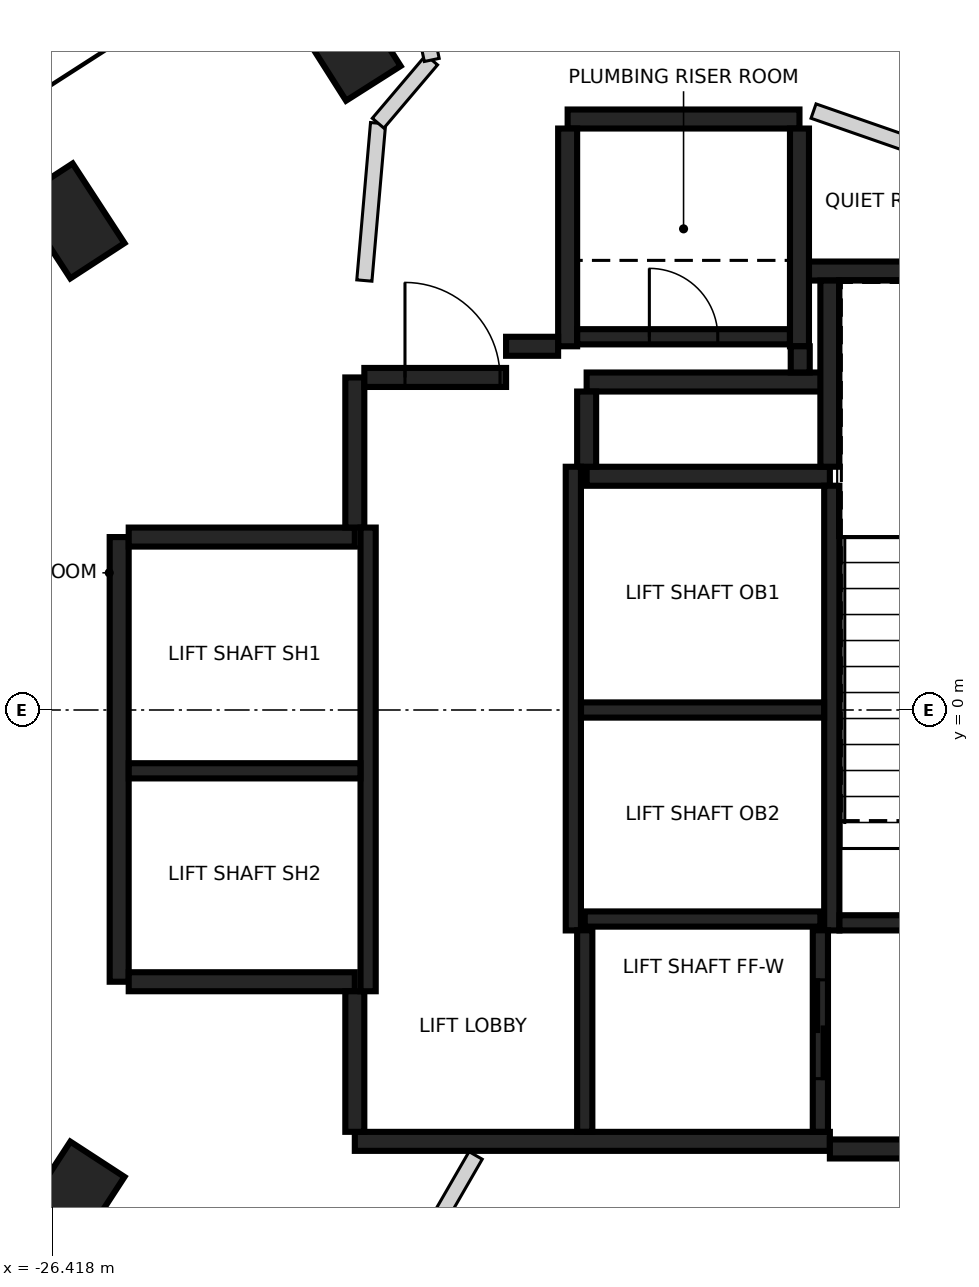
"""IFC4 building model, lengths in metres.
Left out: names, types, materials, properties, quantities, classifications, styles, units other than length and angle.
Written with IfcOpenShell. Run it as: python <this file> out.ifc"""

import sys

from ifc_helpers import new_model, si_unit, direction, frame, frame_2d, origin, origin_2d, place, context, subcontext, project, spatial, rectangle, extrude, element, fill, save


model = new_model("IFC4")
c1 = context("Model", 3, precision=1e-05, world=origin(), true_north=direction((0.0, 1.0)))
c2 = subcontext(c1, "Body", "Model", "MODEL_VIEW")
j1 = project(units=[si_unit("LENGTHUNIT", "METRE"), si_unit("PLANEANGLEUNIT", "RADIAN")], contexts=[c1])
p1 = place(None, origin())
s1 = spatial("IfcSite", under=j1, at=p1, CompositionType="ELEMENT")
p2 = place(p1, origin())
s2 = spatial("IfcBuilding", under=s1, at=p2, CompositionType="ELEMENT")
p3 = place(p2, frame((0.0, 0.0, 157.6)))
s3 = spatial("IfcBuildingStorey", under=s2, at=p3, CompositionType="ELEMENT", Elevation=157.6)
for number, where, z_axis, x_axis in (
    (1, (-22.529, 8.772, -0.4), (0.0, 0.0, 1.0), (-0.536, 0.844, 0.0)),
    (2, (-26.165, 6.434, -0.4), (0.0, 0.0, 1.0), (-0.546, 0.838, 0.0)),
    (3, (-26.165, -6.434, -0.4), (0.0, 0.0, 1.0), (0.546, 0.838, 0.0)),
):
    element("IfcColumn", number, at=place(p3, frame(where, z_axis=z_axis, x_axis=x_axis)), inside=s3, PredefinedType="COLUMN", context=c2, shape_type="SweptSolid", body=[
        extrude(rectangle(XDim=1.25, YDim=0.85, at=origin_2d()), origin(), (0.0, 0.0, 1.0), 3.6),
    ])
p4 = place(p3, frame((-16.187, -5.675, 0.0), z_axis=(0.0, 0.0, 1.0), x_axis=(-1.0, 0.0, 0.0)))
e4 = element("IfcWall", 4, at=p4, inside=s3, PredefinedType="SHEAR", context=c2, shape_type="SweptSolid", body=[
    extrude(rectangle(XDim=6.25, YDim=0.25, at=frame_2d((3.125, 0.0))), origin(), (0.0, 0.0, 1.0), 3.2),
])
p5 = place(p3, frame((-25.537, -3.575, 0.0), z_axis=(0.0, 0.0, 1.0), x_axis=(0.0, 1.0, 0.0)))
e5 = element("IfcWall", 5, at=p5, inside=s3, PredefinedType="SHEAR", context=c2, shape_type="SweptSolid", body=[
    extrude(rectangle(XDim=5.85, YDim=0.25, at=frame_2d((2.925, 0.0))), origin(), (0.0, 0.0, 1.0), 3.2),
])
p6 = place(p3, frame((-10.963, -5.775, 0.0), z_axis=(0.0, 0.0, 1.0), x_axis=(-1.0, 0.0, 0.0)))
e6 = element("IfcWall", 6, at=p6, inside=s3, PredefinedType="SHEAR", context=c2, shape_type="SweptSolid", body=[
    extrude(rectangle(XDim=5.225, YDim=0.25, at=frame_2d((2.612, 0.0))), origin(), (0.0, 0.0, 1.0), 3.2),
])
p7 = place(p3, frame((-16.472, 5.775, 0.0), z_axis=(0.0, 0.0, 1.0), x_axis=(1.0, 0.0, 0.0)))
e7 = element("IfcWall", 7, at=p7, inside=s3, PredefinedType="SHEAR", context=c2, shape_type="SweptSolid", body=[
    extrude(rectangle(XDim=5.51, YDim=0.25, at=frame_2d((2.755, 0.0))), origin(), (0.0, 0.0, 1.0), 3.2),
])
p8 = place(p3, frame((-19.387, 3.075, 0.0), z_axis=(0.0, 0.0, 1.0), x_axis=(1.0, 0.0, 0.0)))
e8 = element("IfcWall", 8, at=p8, inside=s3, PredefinedType="SHEAR", context=c2, shape_type="SweptSolid", body=[
    extrude(rectangle(XDim=3.2, YDim=0.25, at=frame_2d((1.6, 0.0))), origin(), (0.0, 0.0, 1.0), 3.2),
])
for number, where, z_axis, x_axis in (
    (9, (-22.437, -3.575, 0.0), (0.0, 0.0, 1.0), (-1.0, 0.0, 0.0)),
    (10, (-25.412, 2.275, 0.0), (0.0, 0.0, 1.0), (1.0, 0.0, 0.0)),
):
    element("IfcWall", number, at=place(p3, frame(where, z_axis=z_axis, x_axis=x_axis)), inside=s3, PredefinedType="SHEAR", context=c2, shape_type="SweptSolid", body=[
        extrude(rectangle(XDim=2.975, YDim=0.25, at=frame_2d((1.487, 0.0))), origin(), (0.0, 0.0, 1.0), 3.2),
    ])
p9 = place(p3, frame((-19.637, 7.775, 0.0), z_axis=(0.0, 0.0, 1.0), x_axis=(1.0, 0.0, 0.0)))
e11 = element("IfcWall", 11, at=p9, inside=s3, PredefinedType="SHEAR", context=c2, shape_type="SweptSolid", body=[
    extrude(rectangle(XDim=3.05, YDim=0.25, at=frame_2d((1.525, 0.0))), origin(), (0.0, 0.0, 1.0), 3.2),
])
for number, where, z_axis, x_axis in (
    (12, (-16.587, 7.65, 0.0), (0.0, 0.0, 1.0), (0.0, -1.0, 0.0)),
    (13, (-19.637, 4.785, 0.0), (0.0, 0.0, 1.0), (0.0, 1.0, 0.0)),
):
    element("IfcWall", number, at=place(p3, frame(where, z_axis=z_axis, x_axis=x_axis)), inside=s3, PredefinedType="SHEAR", context=c2, shape_type="SweptSolid", body=[
        extrude(rectangle(XDim=2.865, YDim=0.25, at=frame_2d((1.432, 0.0))), origin(), (0.0, 0.0, 1.0), 3.2),
    ])
p10 = place(p3, frame((-16.302, 4.315, 0.0), z_axis=(0.0, 0.0, 1.0), x_axis=(-1.0, 0.0, 0.0)))
e14 = element("IfcWall", 14, at=p10, inside=s3, PredefinedType="SHEAR", context=c2, shape_type="SweptSolid", body=[
    extrude(rectangle(XDim=3.085, YDim=0.25, at=frame_2d((1.542, 0.0))), origin(), (0.0, 0.0, 1.0), 3.2),
])
p11 = place(p3, frame((-16.187, 3.2, 0.0), z_axis=(0.0, 0.0, 1.0), x_axis=(0.0, 1.0, 0.0)))
e15 = element("IfcWall", 15, at=p11, inside=s3, PredefinedType="SHEAR", context=c2, shape_type="SweptSolid", body=[
    extrude(rectangle(XDim=2.449, YDim=0.25, at=frame_2d((1.225, 0.0))), origin(), (0.0, 0.0, 1.0), 3.2),
])
p12 = place(p3, frame((-22.437, 2.4, 0.0), z_axis=(0.0, 0.0, 1.0), x_axis=(0.0, 1.0, 0.0)))
e16 = element("IfcWall", 16, at=p12, inside=s3, PredefinedType="SHEAR", context=c2, shape_type="SweptSolid", body=[
    extrude(rectangle(XDim=1.975, YDim=0.25, at=frame_2d((0.987, 0.0))), origin(), (0.0, 0.0, 1.0), 3.2),
])
p13 = place(p3, frame((-22.437, -5.55, 0.0), z_axis=(0.0, 0.0, 1.0), x_axis=(0.0, 1.0, 0.0)))
e17 = element("IfcWall", 17, at=p13, inside=s3, PredefinedType="SHEAR", context=c2, shape_type="SweptSolid", body=[
    extrude(rectangle(XDim=1.849, YDim=0.25, at=frame_2d((0.925, 0.0))), origin(), (0.0, 0.0, 1.0), 3.2),
])
p14 = place(p3, frame((-22.312, 4.375, 0.0), z_axis=(0.0, 0.0, 1.0), x_axis=(1.0, 0.0, 0.0)))
e18 = element("IfcWall", 18, at=p14, inside=s3, PredefinedType="SHEAR", context=c2, shape_type="SweptSolid", body=[
    extrude(rectangle(XDim=1.865, YDim=0.25, at=frame_2d((0.932, 0.0))), origin(), (0.0, 0.0, 1.0), 3.2),
])
p15 = place(p14, frame((0.535, 0.0, 0.0)))
e19 = element("IfcOpeningElement", 19, at=p15, cuts=e18, PredefinedType="OPENING", context=c2, shape_type="SweptSolid", body=[
    extrude(rectangle(XDim=1.25, YDim=2.1, at=frame_2d((0.625, 1.05))), frame((0.0, 0.135, 0.0), z_axis=(0.0, -1.0, 0.0), x_axis=(1.0, 0.0, 0.0)), (0.0, 0.0, 1.0), 0.27),
])
p16 = place(p3, frame((-19.387, 4.19, 0.0), z_axis=(0.0, 0.0, 1.0), x_axis=(0.0, -1.0, 0.0)))
e20 = element("IfcWall", 20, at=p16, inside=s3, PredefinedType="SHEAR", context=c2, shape_type="SweptSolid", body=[
    extrude(rectangle(XDim=0.989, YDim=0.25, at=frame_2d((0.495, 0.0))), origin(), (0.0, 0.0, 1.0), 3.2),
])
p17 = place(p3, frame((-20.447, 4.785, 0.0), z_axis=(0.0, 0.0, 1.0), x_axis=(1.0, 0.0, 0.0)))
e21 = element("IfcWall", 21, at=p17, inside=s3, PredefinedType="SHEAR", context=c2, shape_type="SweptSolid", body=[
    extrude(rectangle(XDim=0.685, YDim=0.25, at=frame_2d((0.342, 0.0))), origin(), (0.0, 0.0, 1.0), 3.2),
])
p18 = place(p3, frame((-16.577, 4.785, 0.0), z_axis=(0.0, 0.0, 1.0), x_axis=(0.0, -1.0, 0.0)))
e22 = element("IfcWall", 22, at=p18, inside=s3, PredefinedType="SHEAR", context=c2, shape_type="SweptSolid", body=[
    extrude(rectangle(XDim=0.344, YDim=0.25, at=frame_2d((0.172, 0.0))), origin(), (0.0, 0.0, 1.0), 3.2),
])
p19 = place(p3, frame((-16.162, 2.951, 0.0), z_axis=(0.0, 0.0, 1.0), x_axis=(0.0, -1.0, 0.0)))
e23 = element("IfcWall", 23, at=p19, inside=s3, PredefinedType="SHEAR", context=c2, shape_type="SweptSolid", body=[
    extrude(rectangle(XDim=5.851, YDim=0.2, at=frame_2d((2.925, 0.0))), origin(), (0.0, 0.0, 1.0), 3.2),
])
for number, where, z_axis, x_axis in (
    (24, (-19.562, -2.9, 0.0), (0.0, 0.0, 1.0), (0.0, 1.0, 0.0)),
    (25, (-22.262, 2.4, 0.0), (0.0, 0.0, 1.0), (0.0, -1.0, 0.0)),
):
    element("IfcWall", number, at=place(p3, frame(where, z_axis=z_axis, x_axis=x_axis)), inside=s3, PredefinedType="SHEAR", context=c2, shape_type="SweptSolid", body=[
        extrude(rectangle(XDim=6.1, YDim=0.2, at=frame_2d((3.05, 0.0))), origin(), (0.0, 0.0, 1.0), 3.2),
    ])
p20 = place(p3, frame((-10.963, -2.8, 0.0), z_axis=(0.0, 0.0, 1.0), x_axis=(-1.0, 0.0, 0.0)))
e26 = element("IfcWall", 26, at=p20, inside=s3, PredefinedType="SHEAR", context=c2, shape_type="SweptSolid", body=[
    extrude(rectangle(XDim=5.098, YDim=0.2, at=frame_2d((2.549, 0.0))), origin(), (0.0, 0.0, 1.0), 3.2),
])
p21 = place(p20, frame((1.774, 0.0, 0.0)))
e27 = element("IfcOpeningElement", 27, at=p21, cuts=e26, PredefinedType="OPENING", context=c2, shape_type="SweptSolid", body=[
    extrude(rectangle(XDim=1.4, YDim=2.1, at=frame_2d((0.7, 1.05))), frame((0.0, 0.11, 0.0), z_axis=(0.0, -1.0, 0.0), x_axis=(1.0, 0.0, 0.0)), (0.0, 0.0, 1.0), 0.22),
])
p22 = place(p3, frame((-16.263, 0.0, 0.0), z_axis=(0.0, 0.0, 1.0), x_axis=(-1.0, 0.0, 0.0)))
e28 = element("IfcWall", 28, at=p22, inside=s3, PredefinedType="SHEAR", context=c2, shape_type="SweptSolid", body=[
    extrude(rectangle(XDim=3.198, YDim=0.2, at=frame_2d((1.599, 0.0))), origin(), (0.0, 0.0, 1.0), 3.2),
])
p23 = place(p3, frame((-22.363, -0.8, 0.0), z_axis=(0.0, 0.0, 1.0), x_axis=(-1.0, 0.0, 0.0)))
e29 = element("IfcWall", 29, at=p23, inside=s3, PredefinedType="SHEAR", context=c2, shape_type="SweptSolid", body=[
    extrude(rectangle(XDim=3.048, YDim=0.2, at=frame_2d((1.524, 0.0))), origin(), (0.0, 0.0, 1.0), 3.2),
])
p24 = place(p3, frame((-19.511, 4.91, 0.0), z_axis=(0.0, 0.0, 1.0), x_axis=(1.0, 0.0, 0.0)))
e30 = element("IfcWall", 30, at=p24, inside=s3, PredefinedType="SHEAR", context=c2, shape_type="SweptSolid", body=[
    extrude(rectangle(XDim=2.798, YDim=0.2, at=frame_2d((1.399, 0.0))), origin(), (0.0, 0.0, 1.0), 3.2),
])
p25 = place(p24, frame((0.949, 0.0, 0.0)))
e31 = element("IfcOpeningElement", 31, at=p25, cuts=e30, PredefinedType="OPENING", context=c2, shape_type="SweptSolid", body=[
    extrude(rectangle(XDim=0.9, YDim=2.1, at=frame_2d((0.45, 1.05))), frame((0.0, 0.11, 0.0), z_axis=(0.0, -1.0, 0.0), x_axis=(1.0, 0.0, 0.0)), (0.0, 0.0, 1.0), 0.22),
])
p26 = place(p3, frame((-19.412, -2.75, 0.0), z_axis=(0.0, 0.0, 1.0), x_axis=(1.0, 0.0, 0.0)))
e32 = element("IfcWall", 32, at=p26, inside=s3, PredefinedType="SHEAR", context=c2, shape_type="SweptSolid", body=[
    extrude(rectangle(XDim=3.1, YDim=0.2, at=frame_2d((1.55, 0.0))), origin(), (0.0, 0.0, 1.0), 3.2),
])
p27 = place(p3, frame((-16.312, -2.898, 0.0), z_axis=(0.0, 0.0, 1.0), x_axis=(0.0, -1.0, 0.0)))
e33 = element("IfcWall", 33, at=p27, inside=s3, PredefinedType="SHEAR", context=c2, shape_type="SweptSolid", body=[
    extrude(rectangle(XDim=2.651, YDim=0.2, at=frame_2d((1.325, 0.0))), origin(), (0.0, 0.0, 1.0), 3.2),
])
p28 = place(p27, frame((0.652, 0.0, 0.0)))
e34 = element("IfcOpeningElement", 34, at=p28, cuts=e33, PredefinedType="OPENING", context=c2, shape_type="SweptSolid", body=[
    extrude(rectangle(XDim=1.3, YDim=2.1, at=frame_2d((0.65, 1.05))), frame((0.0, 0.11, 0.0), z_axis=(0.0, -1.0, 0.0), x_axis=(1.0, 0.0, 0.0)), (0.0, 0.0, 1.0), 0.22),
])
p29 = place(p3, frame((-19.412, -5.549, 0.0), z_axis=(0.0, 0.0, 1.0), x_axis=(0.0, 1.0, 0.0)))
e35 = element("IfcWall", 35, at=p29, inside=s3, PredefinedType="SHEAR", context=c2, shape_type="SweptSolid", body=[
    extrude(rectangle(XDim=2.651, YDim=0.2, at=frame_2d((1.325, 0.0))), origin(), (0.0, 0.0, 1.0), 3.2),
])
p30 = place(p3, frame((-22.131, 7.72, 0.0), z_axis=(0.0, 0.0, 1.0), x_axis=(-0.086827346826, -0.996223374471, 0.0)))
e36 = element("IfcWall", 36, at=p30, inside=s3, PredefinedType="PARTITIONING", context=c2, shape_type="SweptSolid", body=[
    extrude(rectangle(XDim=2.078, YDim=0.2, at=frame_2d((1.039, 0.0))), origin(), (0.0, 0.0, 1.0), 3.2),
])
p31 = place(p3, frame((-22.131, 7.72, 0.0), z_axis=(0.0, 0.0, 1.0), x_axis=(0.647024749006, 0.762468998828, 0.0)))
e37 = element("IfcWall", 37, at=p31, inside=s3, PredefinedType="PARTITIONING", context=c2, shape_type="SweptSolid", body=[
    extrude(rectangle(XDim=1.091, YDim=0.2, at=frame_2d((0.546, 0.0))), origin(), (0.0, 0.0, 1.0), 3.2),
])
p32 = place(p3, frame((-21.605, 9.412, 0.0), z_axis=(0.0, 0.0, 1.0), x_axis=(0.204764111512, -0.978811349871, 0.0)))
e38 = element("IfcWall", 38, at=p32, inside=s3, PredefinedType="PARTITIONING", context=c2, shape_type="SweptSolid", body=[
    extrude(rectangle(XDim=0.879, YDim=0.2, at=frame_2d((0.439, 0.0))), origin(), (0.0, 0.0, 1.0), 2.3),
])
p33 = place(p3, frame((-16.402, 7.879, 0.0), z_axis=(0.0, 0.0, 1.0), x_axis=(0.944492255471, -0.328533680702, 0.0)))
e39 = element("IfcWall", 39, at=p33, inside=s3, PredefinedType="PARTITIONING", context=c2, shape_type="SweptSolid", body=[
    extrude(rectangle(XDim=5.802, YDim=0.2, at=frame_2d((2.901, 0.0))), origin(), (0.0, 0.0, 1.0), 3.2),
])
p34 = place(p33, frame((2.37, 0.0, 0.0)))
e40 = element("IfcOpeningElement", 40, at=p34, cuts=e39, PredefinedType="OPENING", context=c2, shape_type="SweptSolid", body=[
    extrude(rectangle(XDim=1.0, YDim=2.1, at=frame_2d((0.5, 1.05))), frame((0.0, 0.11, 0.0), z_axis=(0.0, -1.0, 0.0), x_axis=(1.0, 0.0, 0.0)), (0.0, 0.0, 1.0), 0.22),
])
p35 = place(p3, frame((-23.351, -10.197, 0.0), z_axis=(0.0, 0.0, 1.0), x_axis=(0.499872996861, 0.866098716665, 0.0)))
e41 = element("IfcWall", 41, at=p35, inside=s3, PredefinedType="PARTITIONING", context=c2, shape_type="SweptSolid", body=[
    extrude(rectangle(XDim=5.007, YDim=0.2, at=frame_2d((2.503, 0.0))), origin(), (0.0, 0.0, 1.0), 3.2),
])
p36 = place(p28, origin())
e42 = element("IfcDoor", 42, at=p36, inside=s3, OperationType="SLIDING_TO_LEFT", PredefinedType="DOOR", context=c2, shape_type="SweptSolid", body=[
    extrude(rectangle(XDim=1.3, YDim=2.1, at=frame_2d((0.65, 1.05))), frame((0.0, 0.025, 0.0), z_axis=(0.0, -1.0, 0.0), x_axis=(1.0, 0.0, 0.0)), (0.0, 0.0, 1.0), 0.05),
])
fill(e34, e42)
p37 = place(p15, origin())
e43 = element("IfcDoor", 43, at=p37, inside=s3, OperationType="SINGLE_SWING_LEFT", PredefinedType="DOOR", context=c2, shape_type="SweptSolid", body=[
    extrude(rectangle(XDim=1.25, YDim=2.1, at=frame_2d((0.625, 1.05))), frame((0.0, 0.025, 0.0), z_axis=(0.0, -1.0, 0.0), x_axis=(1.0, 0.0, 0.0)), (0.0, 0.0, 1.0), 0.05),
])
fill(e19, e43)
p38 = place(p25, origin())
e44 = element("IfcDoor", 44, at=p38, inside=s3, OperationType="SINGLE_SWING_RIGHT", PredefinedType="DOOR", context=c2, shape_type="SweptSolid", body=[
    extrude(rectangle(XDim=0.9, YDim=2.1, at=frame_2d((0.45, 1.05))), frame((0.0, 0.025, 0.0), z_axis=(0.0, -1.0, 0.0), x_axis=(1.0, 0.0, 0.0)), (0.0, 0.0, 1.0), 0.05),
])
fill(e31, e44)
save(model, sys.argv[1])
